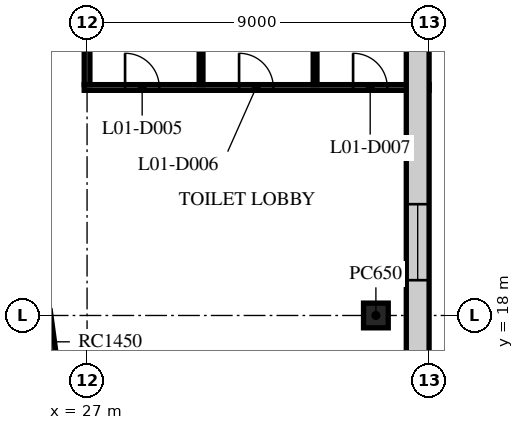
"""IFC4 building model, lengths in metres.
Left out: names, types, materials, properties, quantities, classifications, styles, units other than length and angle.
Written with IfcOpenShell. Run it as: python <this file> out.ifc"""

import sys

from ifc_helpers import new_model, si_unit, direction, frame, frame_2d, origin, origin_2d, place, context, subcontext, project, spatial, rectangle, extrude, element, fill, save


model = new_model("IFC4")
c1 = context("Model", 3, precision=1e-05, world=origin(), true_north=direction((0.0, 1.0)))
c2 = subcontext(c1, "Body", "Model", "MODEL_VIEW")
j1 = project(units=[si_unit("LENGTHUNIT", "METRE"), si_unit("PLANEANGLEUNIT", "RADIAN")], contexts=[c1])
p1 = place(None, origin())
s1 = spatial("IfcSite", under=j1, at=p1, CompositionType="ELEMENT")
p2 = place(p1, origin())
s2 = spatial("IfcBuilding", under=s1, at=p2, CompositionType="ELEMENT")
p3 = place(p2, frame((0.0, 0.0, 4.5)))
s3 = spatial("IfcBuildingStorey", under=s2, at=p3, CompositionType="ELEMENT", Elevation=4.5)
p4 = place(p3, frame((34.6, 18.0, 0.0), z_axis=(0.0, 0.0, 1.0), x_axis=(1.0, 0.0, 0.0)))
e1 = element("IfcColumn", 1, at=p4, inside=s3, PredefinedType="COLUMN", context=c2, shape_type="SweptSolid", body=[
    extrude(rectangle(XDim=0.65, YDim=0.65, at=origin_2d()), origin(), (0.0, 0.0, 1.0), 4.5),
])
p5 = place(p3, frame((25.412, 17.307, 0.0), z_axis=(0.0, 0.0, 1.0), x_axis=(0.991001197216, 0.133853005627, 0.0)))
e2 = element("IfcColumn", 2, at=p5, inside=s3, PredefinedType="COLUMN", context=c2, shape_type="SweptSolid", body=[
    extrude(rectangle(XDim=1.45, YDim=1.45, at=origin_2d()), origin(), (0.0, 0.0, 1.0), 4.5),
])
p6 = place(p3, frame((26.925, 24.0, 0.0), z_axis=(0.0, 0.0, 1.0), x_axis=(1.0, 0.0, 0.0)))
e3 = element("IfcWall", 3, at=p6, inside=s3, PredefinedType="PARTITIONING", context=c2, shape_type="SweptSolid", body=[
    extrude(rectangle(XDim=9.075, YDim=0.15, at=frame_2d((4.538, 0.0))), origin(), (0.0, 0.0, 1.0), 4.1),
])
p7 = place(p6, frame((1.075, 0.0, 0.0)))
e4 = element("IfcOpeningElement", 4, at=p7, cuts=e3, PredefinedType="OPENING", context=c2, shape_type="SweptSolid", body=[
    extrude(rectangle(XDim=0.9, YDim=2.1, at=frame_2d((0.45, 1.05))), frame((0.0, 0.085, 0.0), z_axis=(0.0, -1.0, 0.0), x_axis=(1.0, 0.0, 0.0)), (0.0, 0.0, 1.0), 0.17),
])
p8 = place(p6, frame((4.075, 0.0, 0.0)))
e5 = element("IfcOpeningElement", 5, at=p8, cuts=e3, PredefinedType="OPENING", context=c2, shape_type="SweptSolid", body=[
    extrude(rectangle(XDim=0.9, YDim=2.1, at=frame_2d((0.45, 1.05))), frame((0.0, 0.085, 0.0), z_axis=(0.0, -1.0, 0.0), x_axis=(1.0, 0.0, 0.0)), (0.0, 0.0, 1.0), 0.17),
])
p9 = place(p6, frame((7.075, 0.0, 0.0)))
e6 = element("IfcOpeningElement", 6, at=p9, cuts=e3, PredefinedType="OPENING", context=c2, shape_type="SweptSolid", body=[
    extrude(rectangle(XDim=0.9, YDim=2.1, at=frame_2d((0.45, 1.05))), frame((0.0, 0.085, 0.0), z_axis=(0.0, -1.0, 0.0), x_axis=(1.0, 0.0, 0.0)), (0.0, 0.0, 1.0), 0.17),
])
p10 = place(p3, frame((27.0, 24.075, 0.0), z_axis=(0.0, 0.0, 1.0), x_axis=(0.0, 1.0, 0.0)))
e7 = element("IfcWall", 7, at=p10, inside=s3, PredefinedType="PARTITIONING", context=c2, shape_type="SweptSolid", body=[
    extrude(rectangle(XDim=2.425, YDim=0.15, at=frame_2d((1.212, 0.0))), origin(), (0.0, 0.0, 1.0), 4.1),
])
for number, where, z_axis, x_axis in (
    (8, (30.0, 24.075, 0.0), (0.0, 0.0, 1.0), (0.0, 1.0, 0.0)),
    (9, (33.0, 24.075, 0.0), (0.0, 0.0, 1.0), (0.0, 1.0, 0.0)),
):
    element("IfcWall", number, at=place(p3, frame(where, z_axis=z_axis, x_axis=x_axis)), inside=s3, PredefinedType="PARTITIONING", context=c2, shape_type="SweptSolid", body=[
        extrude(rectangle(XDim=11.925, YDim=0.1, at=frame_2d((5.962, 0.0))), origin(), (0.0, 0.0, 1.0), 4.1),
    ])
p11 = place(p3, frame((35.7, -30.876, 0.0), z_axis=(0.0, 0.0, 1.0), x_axis=(0.0, 1.0, 0.0)))
e10 = element("IfcWall", 10, at=p11, inside=s3, PredefinedType="STANDARD", context=c2, shape_type="SweptSolid", body=[
    extrude(rectangle(XDim=61.751, YDim=0.6, at=frame_2d((30.876, 0.0))), origin(), (0.0, 0.0, 1.0), 4.1),
])
p12 = place(p11, frame((1.152, 0.0, 0.9)))
e11 = element("IfcOpeningElement", 11, at=p12, cuts=e10, PredefinedType="OPENING", context=c2, shape_type="SweptSolid", body=[
    extrude(rectangle(XDim=2.0, YDim=3.0, at=frame_2d((1.0, 1.5))), frame((0.0, 0.31, 0.0), z_axis=(0.0, -1.0, 0.0), x_axis=(1.0, 0.0, 0.0)), (0.0, 0.0, 1.0), 0.62),
])
p13 = place(p11, frame((5.519, 0.0, 0.9)))
e12 = element("IfcOpeningElement", 12, at=p13, cuts=e10, PredefinedType="OPENING", context=c2, shape_type="SweptSolid", body=[
    extrude(rectangle(XDim=2.0, YDim=3.0, at=frame_2d((1.0, 1.5))), frame((0.0, 0.31, 0.0), z_axis=(0.0, -1.0, 0.0), x_axis=(1.0, 0.0, 0.0)), (0.0, 0.0, 1.0), 0.62),
])
p14 = place(p11, frame((9.947, 0.0, 0.9)))
e13 = element("IfcOpeningElement", 13, at=p14, cuts=e10, PredefinedType="OPENING", context=c2, shape_type="SweptSolid", body=[
    extrude(rectangle(XDim=2.0, YDim=3.0, at=frame_2d((1.0, 1.5))), frame((0.0, 0.31, 0.0), z_axis=(0.0, -1.0, 0.0), x_axis=(1.0, 0.0, 0.0)), (0.0, 0.0, 1.0), 0.62),
])
p15 = place(p11, frame((14.376, 0.0, 0.9)))
e14 = element("IfcOpeningElement", 14, at=p15, cuts=e10, PredefinedType="OPENING", context=c2, shape_type="SweptSolid", body=[
    extrude(rectangle(XDim=2.0, YDim=3.0, at=frame_2d((1.0, 1.5))), frame((0.0, 0.31, 0.0), z_axis=(0.0, -1.0, 0.0), x_axis=(1.0, 0.0, 0.0)), (0.0, 0.0, 1.0), 0.62),
])
p16 = place(p11, frame((18.804, 0.0, 0.9)))
e15 = element("IfcOpeningElement", 15, at=p16, cuts=e10, PredefinedType="OPENING", context=c2, shape_type="SweptSolid", body=[
    extrude(rectangle(XDim=2.0, YDim=3.0, at=frame_2d((1.0, 1.5))), frame((0.0, 0.31, 0.0), z_axis=(0.0, -1.0, 0.0), x_axis=(1.0, 0.0, 0.0)), (0.0, 0.0, 1.0), 0.62),
])
p17 = place(p11, frame((23.233, 0.0, 0.9)))
e16 = element("IfcOpeningElement", 16, at=p17, cuts=e10, PredefinedType="OPENING", context=c2, shape_type="SweptSolid", body=[
    extrude(rectangle(XDim=2.0, YDim=3.0, at=frame_2d((1.0, 1.5))), frame((0.0, 0.31, 0.0), z_axis=(0.0, -1.0, 0.0), x_axis=(1.0, 0.0, 0.0)), (0.0, 0.0, 1.0), 0.62),
])
p18 = place(p11, frame((27.662, 0.0, 0.9)))
e17 = element("IfcOpeningElement", 17, at=p18, cuts=e10, PredefinedType="OPENING", context=c2, shape_type="SweptSolid", body=[
    extrude(rectangle(XDim=2.0, YDim=3.0, at=frame_2d((1.0, 1.5))), frame((0.0, 0.31, 0.0), z_axis=(0.0, -1.0, 0.0), x_axis=(1.0, 0.0, 0.0)), (0.0, 0.0, 1.0), 0.62),
])
p19 = place(p11, frame((32.09, 0.0, 0.9)))
e18 = element("IfcOpeningElement", 18, at=p19, cuts=e10, PredefinedType="OPENING", context=c2, shape_type="SweptSolid", body=[
    extrude(rectangle(XDim=2.0, YDim=3.0, at=frame_2d((1.0, 1.5))), frame((0.0, 0.31, 0.0), z_axis=(0.0, -1.0, 0.0), x_axis=(1.0, 0.0, 0.0)), (0.0, 0.0, 1.0), 0.62),
])
p20 = place(p11, frame((36.519, 0.0, 0.9)))
e19 = element("IfcOpeningElement", 19, at=p20, cuts=e10, PredefinedType="OPENING", context=c2, shape_type="SweptSolid", body=[
    extrude(rectangle(XDim=2.0, YDim=3.0, at=frame_2d((1.0, 1.5))), frame((0.0, 0.31, 0.0), z_axis=(0.0, -1.0, 0.0), x_axis=(1.0, 0.0, 0.0)), (0.0, 0.0, 1.0), 0.62),
])
p21 = place(p11, frame((45.376, 0.0, 0.9)))
e20 = element("IfcOpeningElement", 20, at=p21, cuts=e10, PredefinedType="OPENING", context=c2, shape_type="SweptSolid", body=[
    extrude(rectangle(XDim=2.0, YDim=3.0, at=frame_2d((1.0, 1.5))), frame((0.0, 0.31, 0.0), z_axis=(0.0, -1.0, 0.0), x_axis=(1.0, 0.0, 0.0)), (0.0, 0.0, 1.0), 0.62),
])
p22 = place(p11, frame((49.804, 0.0, 0.9)))
e21 = element("IfcOpeningElement", 21, at=p22, cuts=e10, PredefinedType="OPENING", context=c2, shape_type="SweptSolid", body=[
    extrude(rectangle(XDim=2.0, YDim=3.0, at=frame_2d((1.0, 1.5))), frame((0.0, 0.31, 0.0), z_axis=(0.0, -1.0, 0.0), x_axis=(1.0, 0.0, 0.0)), (0.0, 0.0, 1.0), 0.62),
])
p23 = place(p11, frame((58.599, 0.0, 0.9)))
e22 = element("IfcOpeningElement", 22, at=p23, cuts=e10, PredefinedType="OPENING", context=c2, shape_type="SweptSolid", body=[
    extrude(rectangle(XDim=2.0, YDim=3.0, at=frame_2d((1.0, 1.5))), frame((0.0, 0.31, 0.0), z_axis=(0.0, -1.0, 0.0), x_axis=(1.0, 0.0, 0.0)), (0.0, 0.0, 1.0), 0.62),
])
p24 = place(p7, origin())
e23 = element("IfcDoor", 23, at=p24, inside=s3, OperationType="SINGLE_SWING_LEFT", PredefinedType="DOOR", context=c2, shape_type="SweptSolid", body=[
    extrude(rectangle(XDim=0.9, YDim=2.1, at=frame_2d((0.45, 1.05))), frame((0.0, 0.025, 0.0), z_axis=(0.0, -1.0, 0.0), x_axis=(1.0, 0.0, 0.0)), (0.0, 0.0, 1.0), 0.05),
])
fill(e4, e23)
p25 = place(p8, origin())
e24 = element("IfcDoor", 24, at=p25, inside=s3, OperationType="SINGLE_SWING_RIGHT", PredefinedType="DOOR", context=c2, shape_type="SweptSolid", body=[
    extrude(rectangle(XDim=0.9, YDim=2.1, at=frame_2d((0.45, 1.05))), frame((0.0, 0.025, 0.0), z_axis=(0.0, -1.0, 0.0), x_axis=(1.0, 0.0, 0.0)), (0.0, 0.0, 1.0), 0.05),
])
fill(e5, e24)
p26 = place(p9, origin())
e25 = element("IfcDoor", 25, at=p26, inside=s3, OperationType="SINGLE_SWING_LEFT", PredefinedType="DOOR", context=c2, shape_type="SweptSolid", body=[
    extrude(rectangle(XDim=0.9, YDim=2.1, at=frame_2d((0.45, 1.05))), frame((0.0, 0.025, 0.0), z_axis=(0.0, -1.0, 0.0), x_axis=(1.0, 0.0, 0.0)), (0.0, 0.0, 1.0), 0.05),
])
fill(e6, e25)
p27 = place(p22, origin())
e26 = element("IfcWindow", 26, at=p27, inside=s3, PartitioningType="SINGLE_PANEL", PredefinedType="WINDOW", context=c2, shape_type="SweptSolid", body=[
    extrude(rectangle(XDim=2.0, YDim=3.0, at=frame_2d((1.0, 1.5))), frame((0.0, 0.03, 0.0), z_axis=(0.0, -1.0, 0.0), x_axis=(1.0, 0.0, 0.0)), (0.0, 0.0, 1.0), 0.06),
])
fill(e21, e26)
save(model, sys.argv[1])
